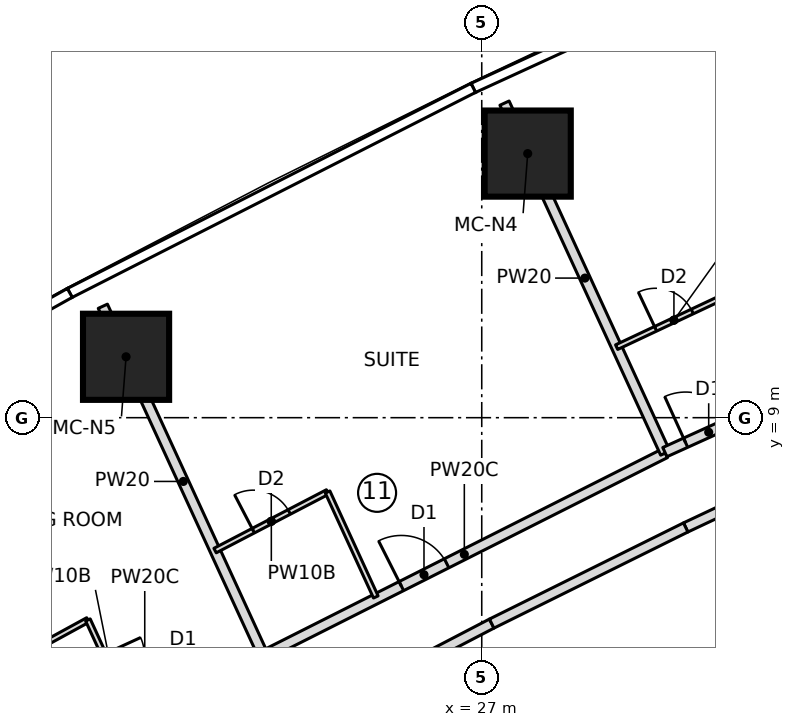
"""IFC4 building model, lengths in metres.
Left out: names, types, materials, properties, quantities, classifications, styles, units other than length and angle.
Written with IfcOpenShell. Run it as: python <this file> out.ifc"""

import sys

from ifc_helpers import new_model, si_unit, direction, frame, frame_2d, origin, origin_2d, place, context, subcontext, project, spatial, rectangle, extrude, element, fill, save


model = new_model("IFC4")
c1 = context("Model", 3, precision=1e-05, world=origin(), true_north=direction((0.0, 1.0)))
c2 = subcontext(c1, "Body", "Model", "MODEL_VIEW")
j1 = project(units=[si_unit("LENGTHUNIT", "METRE"), si_unit("PLANEANGLEUNIT", "RADIAN")], contexts=[c1])
p1 = place(None, origin())
s1 = spatial("IfcSite", under=j1, at=p1, CompositionType="ELEMENT")
p2 = place(p1, origin())
s2 = spatial("IfcBuilding", under=s1, at=p2, CompositionType="ELEMENT")
p3 = place(p2, frame((0.0, 0.0, 95.55)))
s3 = spatial("IfcBuildingStorey", under=s2, at=p3, CompositionType="ELEMENT", Elevation=95.55)
for number, where, z_axis, x_axis in (
    (1, (27.907, 14.212, 0.0), (0.0, 0.0, 1.0), (1.0, 0.0, 0.0)),
    (2, (19.981, 10.202, 0.0), (0.0, 0.0, 1.0), (1.0, 0.0, 0.0)),
):
    element("IfcColumn", number, at=place(p3, frame(where, z_axis=z_axis, x_axis=x_axis)), inside=s3, PredefinedType="COLUMN", context=c2, shape_type="SweptSolid", body=[
        extrude(rectangle(XDim=1.7, YDim=1.7, at=origin_2d()), origin(), (0.0, 0.0, 1.0), 3.55),
    ])
p4 = place(p3, frame((17.801, 4.229, 0.0), z_axis=(0.0, 0.0, 1.0), x_axis=(0.877424481957, 0.479714788663, 0.0)))
e3 = element("IfcWall", 3, at=p4, inside=s3, PredefinedType="PARTITIONING", context=c2, shape_type="SweptSolid", body=[
    extrude(rectangle(XDim=1.625, YDim=0.1, at=frame_2d((0.813, 0.0))), origin(), (0.0, 0.0, 1.0), 3.25),
])
p5 = place(p3, frame((19.228, 5.008, 0.0), z_axis=(0.0, 0.0, 1.0), x_axis=(0.417450047292, -0.908699872354, 0.0)))
e4 = element("IfcWall", 4, at=p5, inside=s3, PredefinedType="PARTITIONING", context=c2, shape_type="SweptSolid", body=[
    extrude(rectangle(XDim=2.283, YDim=0.1, at=frame_2d((1.141, 0.0))), origin(), (0.0, 0.0, 1.0), 3.25),
])
p6 = place(p5, frame((0.75, 0.0, 0.0)))
e5 = element("IfcOpeningElement", 5, at=p6, cuts=e4, PredefinedType="OPENING", context=c2, shape_type="SweptSolid", body=[
    extrude(rectangle(XDim=0.8, YDim=2.1, at=frame_2d((0.4, 1.05))), frame((0.0, 0.06, 0.0), z_axis=(0.0, -1.0, 0.0), x_axis=(1.0, 0.0, 0.0)), (0.0, 0.0, 1.0), 0.12),
])
p7 = place(p3, frame((22.699, 4.284, 0.0), z_axis=(0.0, 0.0, 1.0), x_axis=(-0.417413534969, 0.908716644959, 0.0)))
e6 = element("IfcWall", 6, at=p7, inside=s3, PredefinedType="PARTITIONING", context=c2, shape_type="SweptSolid", body=[
    extrude(rectangle(XDim=7.609, YDim=0.2, at=frame_2d((3.805, 0.0))), origin(), (0.0, 0.0, 1.0), 3.25),
])
p8 = place(p3, frame((22.69, 4.302, 0.0), z_axis=(0.0, 0.0, 1.0), x_axis=(0.892904919467, 0.450245271815, 0.0)))
e7 = element("IfcWall", 7, at=p8, inside=s3, PredefinedType="PARTITIONING", context=c2, shape_type="SweptSolid", body=[
    extrude(rectangle(XDim=8.883, YDim=0.2, at=frame_2d((4.441, 0.0))), origin(), (0.0, 0.0, 1.0), 3.25),
])
p9 = place(p8, frame((3.05, 0.0, 0.0)))
e8 = element("IfcOpeningElement", 8, at=p9, cuts=e7, PredefinedType="OPENING", context=c2, shape_type="SweptSolid", body=[
    extrude(rectangle(XDim=1.0, YDim=2.1, at=frame_2d((0.5, 1.05))), frame((0.0, 0.11, 0.0), z_axis=(0.0, -1.0, 0.0), x_axis=(1.0, 0.0, 0.0)), (0.0, 0.0, 1.0), 0.22),
])
p10 = place(p3, frame((21.738, 6.377, 0.0), z_axis=(0.0, 0.0, 1.0), x_axis=(0.886911586599, 0.461939214135, 0.0)))
e9 = element("IfcWall", 9, at=p10, inside=s3, PredefinedType="PARTITIONING", context=c2, shape_type="SweptSolid", body=[
    extrude(rectangle(XDim=2.503, YDim=0.1, at=frame_2d((1.251, 0.0))), origin(), (0.0, 0.0, 1.0), 3.25),
])
p11 = place(p10, frame((0.85, 0.0, 0.0)))
e10 = element("IfcOpeningElement", 10, at=p11, cuts=e9, PredefinedType="OPENING", context=c2, shape_type="SweptSolid", body=[
    extrude(rectangle(XDim=0.8, YDim=2.1, at=frame_2d((0.4, 1.05))), frame((0.0, 0.06, 0.0), z_axis=(0.0, -1.0, 0.0), x_axis=(1.0, 0.0, 0.0)), (0.0, 0.0, 1.0), 0.12),
])
p12 = place(p3, frame((23.958, 7.533, 0.0), z_axis=(0.0, 0.0, 1.0), x_axis=(0.417454762401, -0.908697706253, 0.0)))
e11 = element("IfcWall", 11, at=p12, inside=s3, PredefinedType="PARTITIONING", context=c2, shape_type="SweptSolid", body=[
    extrude(rectangle(XDim=2.28, YDim=0.1, at=frame_2d((1.14, 0.0))), origin(), (0.0, 0.0, 1.0), 3.25),
])
p13 = place(p3, frame((30.622, 8.302, 0.0), z_axis=(0.0, 0.0, 1.0), x_axis=(-0.417429919618, 0.90870911859, 0.0)))
e12 = element("IfcWall", 12, at=p13, inside=s3, PredefinedType="PARTITIONING", context=c2, shape_type="SweptSolid", body=[
    extrude(rectangle(XDim=7.6, YDim=0.2, at=frame_2d((3.8, 0.0))), origin(), (0.0, 0.0, 1.0), 3.25),
])
p14 = place(p3, frame((30.614, 8.32, 0.0), z_axis=(0.0, 0.0, 1.0), x_axis=(0.910751030363, 0.41295588226, 0.0)))
e13 = element("IfcWall", 13, at=p14, inside=s3, PredefinedType="PARTITIONING", context=c2, shape_type="SweptSolid", body=[
    extrude(rectangle(XDim=8.883, YDim=0.2, at=frame_2d((4.442, 0.0))), origin(), (0.0, 0.0, 1.0), 3.25),
])
p15 = place(p14, frame((0.45, 0.0, 0.0)))
e14 = element("IfcOpeningElement", 14, at=p15, cuts=e13, PredefinedType="OPENING", context=c2, shape_type="SweptSolid", body=[
    extrude(rectangle(XDim=1.0, YDim=2.1, at=frame_2d((0.5, 1.05))), frame((0.0, 0.11, 0.0), z_axis=(0.0, -1.0, 0.0), x_axis=(1.0, 0.0, 0.0)), (0.0, 0.0, 1.0), 0.22),
])
p16 = place(p3, frame((29.662, 10.392, 0.0), z_axis=(0.0, 0.0, 1.0), x_axis=(0.904688082375, 0.426074493027, 0.0)))
e15 = element("IfcWall", 15, at=p16, inside=s3, PredefinedType="PARTITIONING", context=c2, shape_type="SweptSolid", body=[
    extrude(rectangle(XDim=2.5, YDim=0.1, at=frame_2d((1.25, 0.0))), origin(), (0.0, 0.0, 1.0), 3.25),
])
p17 = place(p16, frame((0.85, 0.0, 0.0)))
e16 = element("IfcOpeningElement", 16, at=p17, cuts=e15, PredefinedType="OPENING", context=c2, shape_type="SweptSolid", body=[
    extrude(rectangle(XDim=0.8, YDim=2.1, at=frame_2d((0.4, 1.05))), frame((0.0, 0.06, 0.0), z_axis=(0.0, -1.0, 0.0), x_axis=(1.0, 0.0, 0.0)), (0.0, 0.0, 1.0), 0.12),
])
p18 = place(p3, frame((31.025, 6.833, 0.0), z_axis=(0.0, 0.0, 1.0), x_axis=(0.904690325494, 0.426069730159, 0.0)))
e17 = element("IfcWall", 17, at=p18, inside=s3, PredefinedType="PARTITIONING", context=c2, shape_type="SweptSolid", body=[
    extrude(rectangle(XDim=1.078, YDim=0.2, at=frame_2d((0.539, 0.0))), origin(), (0.0, 0.0, 1.0), 3.25),
])
p19 = place(p3, frame((24.598, 3.582, 0.0), z_axis=(0.0, 0.0, 1.0), x_axis=(0.886905549588, 0.461950804859, 0.0)))
e18 = element("IfcWall", 18, at=p19, inside=s3, PredefinedType="PARTITIONING", context=c2, shape_type="SweptSolid", body=[
    extrude(rectangle(XDim=2.93, YDim=0.2, at=frame_2d((1.465, 0.0))), origin(), (0.0, 0.0, 1.0), 3.25),
])
p20 = place(p3, frame((27.196, 4.936, 0.0), z_axis=(0.0, 0.0, 1.0), x_axis=(0.895975836328, 0.44410280422, 0.0)))
e19 = element("IfcWall", 19, at=p20, inside=s3, PredefinedType="PARTITIONING", context=c2, shape_type="SweptSolid", body=[
    extrude(rectangle(XDim=4.273, YDim=0.2, at=frame_2d((2.137, 0.0))), origin(), (0.0, 0.0, 1.0), 3.25),
])
p21 = place(p11, origin())
e20 = element("IfcDoor", 20, at=p21, inside=s3, OperationType="SINGLE_SWING_LEFT", PredefinedType="DOOR", context=c2, shape_type="SweptSolid", body=[
    extrude(rectangle(XDim=0.8, YDim=2.1, at=frame_2d((0.4, 1.05))), frame((0.0, 0.025, 0.0), z_axis=(0.0, -1.0, 0.0), x_axis=(1.0, 0.0, 0.0)), (0.0, 0.0, 1.0), 0.05),
])
fill(e10, e20)
p22 = place(p9, origin())
e21 = element("IfcDoor", 21, at=p22, inside=s3, OperationType="SINGLE_SWING_LEFT", PredefinedType="DOOR", context=c2, shape_type="SweptSolid", body=[
    extrude(rectangle(XDim=1.0, YDim=2.1, at=frame_2d((0.5, 1.05))), frame((0.0, 0.025, 0.0), z_axis=(0.0, -1.0, 0.0), x_axis=(1.0, 0.0, 0.0)), (0.0, 0.0, 1.0), 0.05),
])
fill(e8, e21)
p23 = place(p17, origin())
e22 = element("IfcDoor", 22, at=p23, inside=s3, OperationType="SINGLE_SWING_LEFT", PredefinedType="DOOR", context=c2, shape_type="SweptSolid", body=[
    extrude(rectangle(XDim=0.8, YDim=2.1, at=frame_2d((0.4, 1.05))), frame((0.0, 0.025, 0.0), z_axis=(0.0, -1.0, 0.0), x_axis=(1.0, 0.0, 0.0)), (0.0, 0.0, 1.0), 0.05),
])
fill(e16, e22)
p24 = place(p15, origin())
e23 = element("IfcDoor", 23, at=p24, inside=s3, OperationType="SINGLE_SWING_LEFT", PredefinedType="DOOR", context=c2, shape_type="SweptSolid", body=[
    extrude(rectangle(XDim=1.0, YDim=2.1, at=frame_2d((0.5, 1.05))), frame((0.0, 0.025, 0.0), z_axis=(0.0, -1.0, 0.0), x_axis=(1.0, 0.0, 0.0)), (0.0, 0.0, 1.0), 0.05),
])
fill(e14, e23)
save(model, sys.argv[1])
